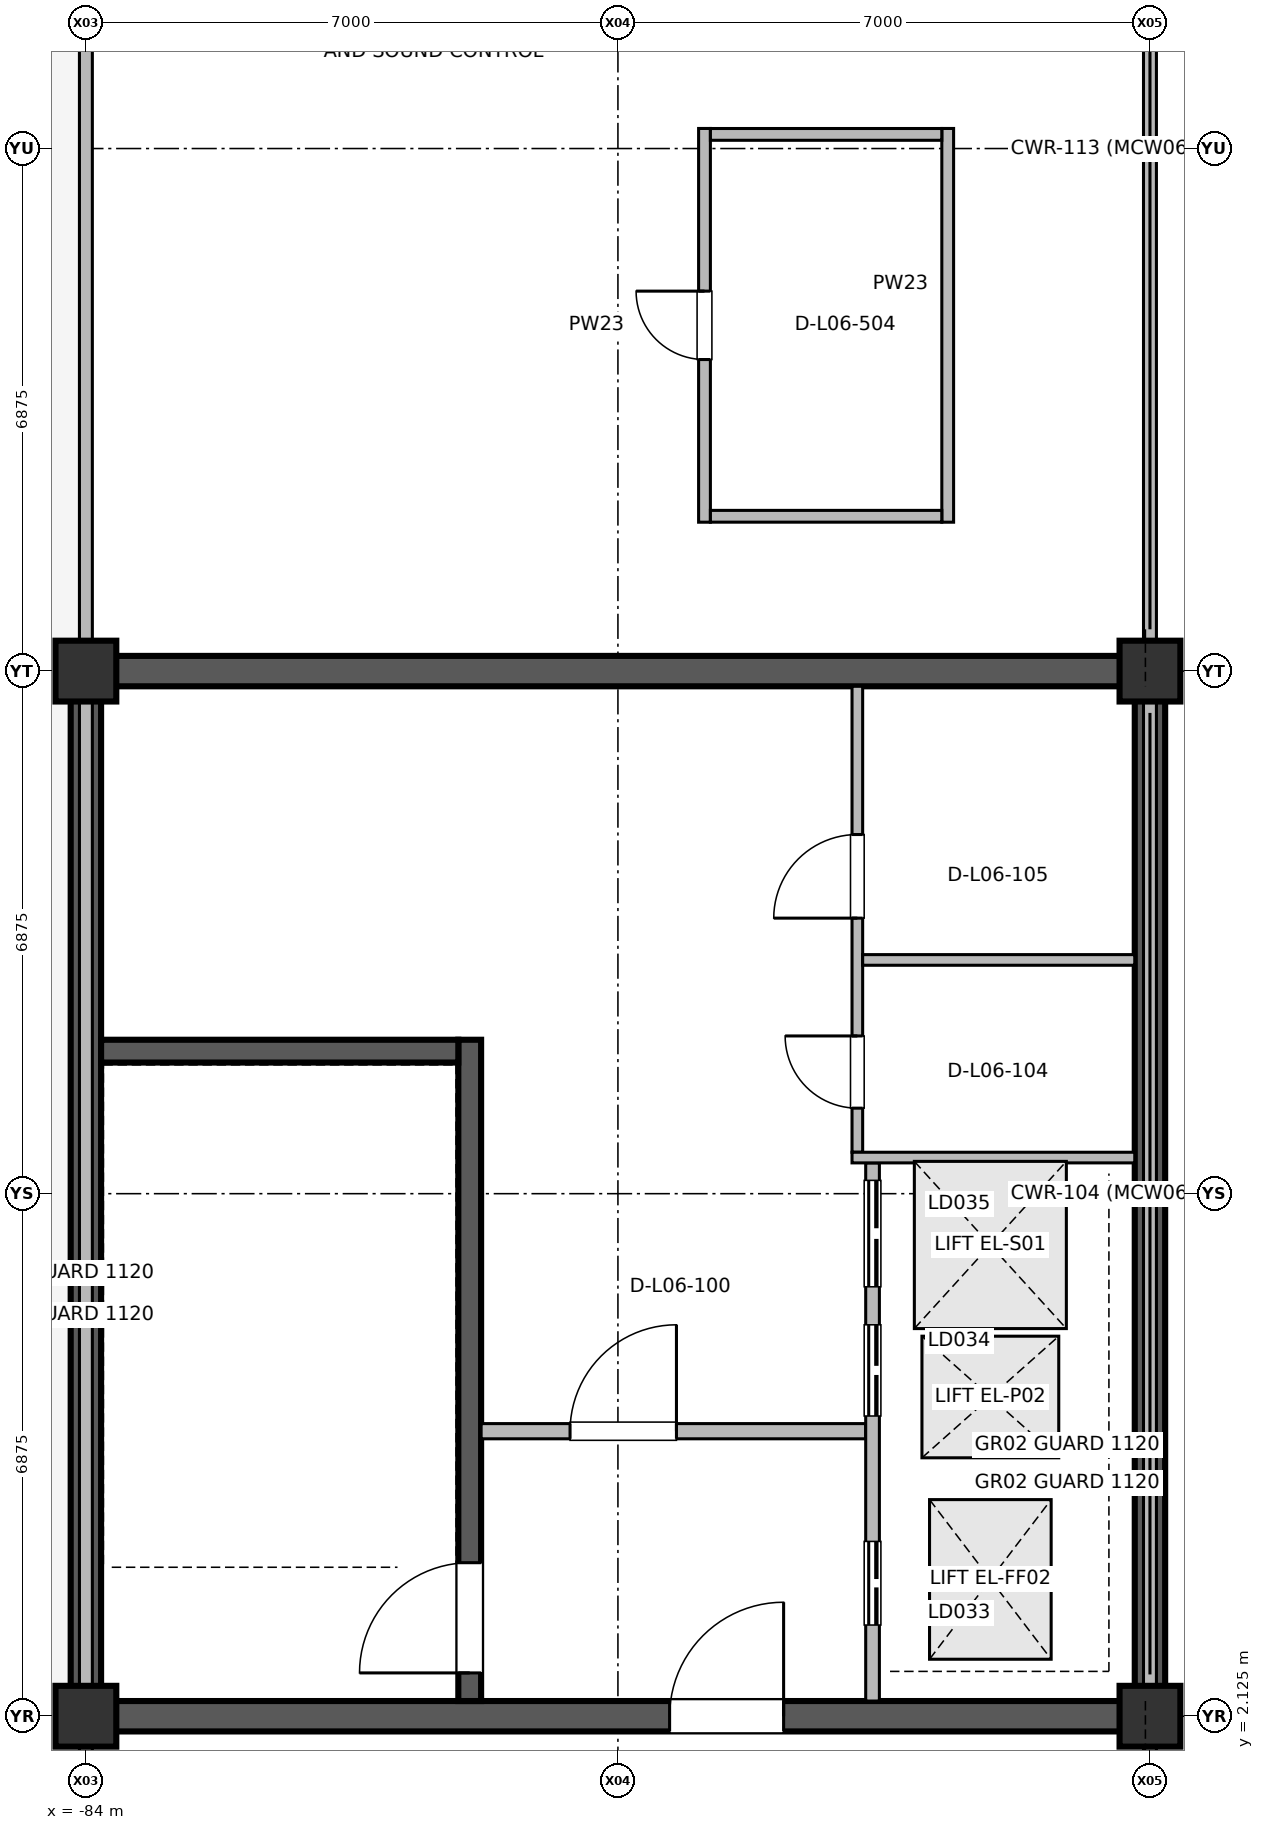
"""IFC4 building model, lengths in metres.
Left out: names, types, materials, properties, quantities, classifications, styles, units other than length and angle.
Written with IfcOpenShell. Run it as: python <this file> out.ifc"""

import sys

from ifc_helpers import new_model, si_unit, direction, frame, frame_2d, origin, origin_2d, place, context, subcontext, project, spatial, rectangle, extrude, element, fill, save


model = new_model("IFC4")
c1 = context("Model", 3, precision=1e-05, world=origin(), true_north=direction((0.0, 1.0)))
c2 = subcontext(c1, "Body", "Model", "MODEL_VIEW")
j1 = project(units=[si_unit("LENGTHUNIT", "METRE"), si_unit("PLANEANGLEUNIT", "RADIAN")], contexts=[c1])
p1 = place(None, origin())
s1 = spatial("IfcSite", under=j1, at=p1, CompositionType="ELEMENT")
p2 = place(p1, origin())
s2 = spatial("IfcBuilding", under=s1, at=p2, CompositionType="ELEMENT")
p3 = place(p2, frame((0.0, 0.0, 26.4)))
s3 = spatial("IfcBuildingStorey", under=s2, at=p3, CompositionType="ELEMENT", Elevation=26.4)
for number, where, z_axis, x_axis in (
    (1, (-84.0, 2.125, 0.0), (0.0, 0.0, 1.0), (1.0, 0.0, 0.0)),
    (2, (-84.0, 15.875, 0.0), (0.0, 0.0, 1.0), (1.0, 0.0, 0.0)),
    (3, (-70.0, 2.125, 0.0), (0.0, 0.0, 1.0), (1.0, 0.0, 0.0)),
    (4, (-70.0, 15.875, 0.0), (0.0, 0.0, 1.0), (1.0, 0.0, 0.0)),
):
    element("IfcColumn", number, at=place(p3, frame(where, z_axis=z_axis, x_axis=x_axis)), inside=s3, PredefinedType="COLUMN", context=c2, shape_type="SweptSolid", body=[
        extrude(rectangle(XDim=0.8, YDim=0.8, at=origin_2d()), origin(), (0.0, 0.0, 1.0), 4.965),
    ])
for number, where, z_axis, x_axis in (
    (5, (-84.0, 2.325, 0.0), (0.0, 0.0, 1.0), (0.0, 1.0, 0.0)),
    (6, (-70.0, 2.325, 0.0), (0.0, 0.0, 1.0), (0.0, 1.0, 0.0)),
):
    element("IfcWall", number, at=place(p3, frame(where, z_axis=z_axis, x_axis=x_axis)), inside=s3, PredefinedType="SHEAR", context=c2, shape_type="SweptSolid", body=[
        extrude(rectangle(XDim=13.35, YDim=0.4, at=frame_2d((6.675, 0.0))), origin(), (0.0, 0.0, 1.0), 4.965),
    ])
p4 = place(p3, frame((-83.8, 2.125, 0.0), z_axis=(0.0, 0.0, 1.0), x_axis=(1.0, 0.0, 0.0)))
e7 = element("IfcWall", 7, at=p4, inside=s3, PredefinedType="SHEAR", context=c2, shape_type="SweptSolid", body=[
    extrude(rectangle(XDim=13.6, YDim=0.4, at=frame_2d((6.8, 0.0))), origin(), (0.0, 0.0, 1.0), 4.965),
])
p5 = place(p4, frame((7.48, 0.0, 0.0)))
e8 = element("IfcOpeningElement", 8, at=p5, cuts=e7, PredefinedType="OPENING", context=c2, shape_type="SweptSolid", body=[
    extrude(rectangle(XDim=1.5, YDim=2.2, at=frame_2d((0.75, 1.1))), frame((0.0, 0.21, 0.0), z_axis=(0.0, -1.0, 0.0), x_axis=(1.0, 0.0, 0.0)), (0.0, 0.0, 1.0), 0.42),
])
p6 = place(p3, frame((-83.8, 15.875, 0.0), z_axis=(0.0, 0.0, 1.0), x_axis=(1.0, 0.0, 0.0)))
e9 = element("IfcWall", 9, at=p6, inside=s3, PredefinedType="SHEAR", context=c2, shape_type="SweptSolid", body=[
    extrude(rectangle(XDim=13.6, YDim=0.4, at=frame_2d((6.8, 0.0))), origin(), (0.0, 0.0, 1.0), 4.965),
])
for number, where, z_axis, x_axis in (
    (10, (-84.0, -45.8, 5.2), (0.0, 0.0, 1.0), (0.0, 1.0, 0.0)),
    (11, (-70.0, -45.8, 5.2), (0.0, 0.0, 1.0), (0.0, 1.0, 0.0)),
):
    element("IfcWall", number, at=place(p3, frame(where, z_axis=z_axis, x_axis=x_axis)), inside=s3, PredefinedType="PARAPET", context=c2, shape_type="SweptSolid", body=[
        extrude(rectangle(XDim=89.0, YDim=0.17, at=frame_2d((44.5, 0.0))), origin(), (0.0, 0.0, 1.0), 1.2),
    ])
p7 = place(p3, frame((-78.95, 2.325, 0.0), z_axis=(0.0, 0.0, 1.0), x_axis=(0.0, 1.0, 0.0)))
e12 = element("IfcWall", 12, at=p7, inside=s3, PredefinedType="SHEAR", context=c2, shape_type="SweptSolid", body=[
    extrude(rectangle(XDim=8.7, YDim=0.3, at=frame_2d((4.35, 0.0))), origin(), (0.0, 0.0, 1.0), 4.965),
])
p8 = place(p7, frame((0.37, 0.0, 0.0)))
e13 = element("IfcOpeningElement", 13, at=p8, cuts=e12, PredefinedType="OPENING", context=c2, shape_type="SweptSolid", body=[
    extrude(rectangle(XDim=1.45, YDim=2.2, at=frame_2d((0.725, 1.1))), frame((0.0, 0.16, 0.0), z_axis=(0.0, -1.0, 0.0), x_axis=(1.0, 0.0, 0.0)), (0.0, 0.0, 1.0), 0.32),
])
p9 = place(p3, frame((-78.8, 5.875, 0.0), z_axis=(0.0, 0.0, 1.0), x_axis=(1.0, 0.0, 0.0)))
e14 = element("IfcWall", 14, at=p9, inside=s3, PredefinedType="PARTITIONING", context=c2, shape_type="SweptSolid", body=[
    extrude(rectangle(XDim=5.06, YDim=0.2, at=frame_2d((2.53, 0.0))), origin(), (0.0, 0.0, 1.0), 4.22),
])
p10 = place(p9, frame((1.17, 0.0, 0.0)))
e15 = element("IfcOpeningElement", 15, at=p10, cuts=e14, PredefinedType="OPENING", context=c2, shape_type="SweptSolid", body=[
    extrude(rectangle(XDim=1.4, YDim=2.2, at=frame_2d((0.7, 1.1))), frame((0.0, 0.11, 0.0), z_axis=(0.0, -1.0, 0.0), x_axis=(1.0, 0.0, 0.0)), (0.0, 0.0, 1.0), 0.22),
])
p11 = place(p3, frame((-73.65, 2.325, 0.0), z_axis=(0.0, 0.0, 1.0), x_axis=(0.0, 1.0, 0.0)))
e16 = element("IfcWall", 16, at=p11, inside=s3, PredefinedType="PARTITIONING", context=c2, shape_type="SweptSolid", body=[
    extrude(rectangle(XDim=7.08, YDim=0.18, at=frame_2d((3.54, 0.0))), origin(), (0.0, 0.0, 1.0), 4.22),
])
p12 = place(p11, frame((1.0, 0.0, 0.0)))
e17 = element("IfcOpeningElement", 17, at=p12, cuts=e16, PredefinedType="OPENING", context=c2, shape_type="SweptSolid", body=[
    extrude(rectangle(XDim=1.1, YDim=2.2, at=frame_2d((0.55, 1.1))), frame((0.0, 0.1, 0.0), z_axis=(0.0, -1.0, 0.0), x_axis=(1.0, 0.0, 0.0)), (0.0, 0.0, 1.0), 0.2),
])
p13 = place(p11, frame((3.75, 0.0, 0.0)))
e18 = element("IfcOpeningElement", 18, at=p13, cuts=e16, PredefinedType="OPENING", context=c2, shape_type="SweptSolid", body=[
    extrude(rectangle(XDim=1.2, YDim=2.25, at=frame_2d((0.6, 1.125))), frame((0.0, 0.1, 0.0), z_axis=(0.0, -1.0, 0.0), x_axis=(1.0, 0.0, 0.0)), (0.0, 0.0, 1.0), 0.2),
])
p14 = place(p11, frame((5.45, 0.0, 0.0)))
e19 = element("IfcOpeningElement", 19, at=p14, cuts=e16, PredefinedType="OPENING", context=c2, shape_type="SweptSolid", body=[
    extrude(rectangle(XDim=1.4, YDim=2.3, at=frame_2d((0.7, 1.15))), frame((0.0, 0.1, 0.0), z_axis=(0.0, -1.0, 0.0), x_axis=(1.0, 0.0, 0.0)), (0.0, 0.0, 1.0), 0.2),
])
p15 = place(p3, frame((-73.85, 9.545, 0.0), z_axis=(0.0, 0.0, 1.0), x_axis=(0.0, 1.0, 0.0)))
e20 = element("IfcWall", 20, at=p15, inside=s3, PredefinedType="PARTITIONING", context=c2, shape_type="SweptSolid", body=[
    extrude(rectangle(XDim=6.13, YDim=0.14, at=frame_2d((3.065, 0.0))), origin(), (0.0, 0.0, 1.0), 4.22),
])
p16 = place(p15, frame((0.58, 0.0, 0.0)))
e21 = element("IfcOpeningElement", 21, at=p16, cuts=e20, PredefinedType="OPENING", context=c2, shape_type="SweptSolid", body=[
    extrude(rectangle(XDim=0.95, YDim=2.15, at=frame_2d((0.475, 1.075))), frame((0.0, 0.08, 0.0), z_axis=(0.0, -1.0, 0.0), x_axis=(1.0, 0.0, 0.0)), (0.0, 0.0, 1.0), 0.16),
])
p17 = place(p15, frame((3.08, 0.0, 0.0)))
e22 = element("IfcOpeningElement", 22, at=p17, cuts=e20, PredefinedType="OPENING", context=c2, shape_type="SweptSolid", body=[
    extrude(rectangle(XDim=1.1, YDim=2.15, at=frame_2d((0.55, 1.075))), frame((0.0, 0.08, 0.0), z_axis=(0.0, -1.0, 0.0), x_axis=(1.0, 0.0, 0.0)), (0.0, 0.0, 1.0), 0.16),
])
p18 = place(p3, frame((-75.861, 17.834, 0.0), z_axis=(0.0, 0.0, 1.0), x_axis=(0.0, 1.0, 0.0)))
e23 = element("IfcWall", 23, at=p18, inside=s3, PredefinedType="PARTITIONING", context=c2, shape_type="SweptSolid", body=[
    extrude(rectangle(XDim=5.18, YDim=0.155, at=frame_2d((2.59, 0.0))), origin(), (0.0, 0.0, 1.0), 4.22),
])
p19 = place(p18, frame((2.14, 0.0, 0.0)))
e24 = element("IfcOpeningElement", 24, at=p19, cuts=e23, PredefinedType="OPENING", context=c2, shape_type="SweptSolid", body=[
    extrude(rectangle(XDim=0.9, YDim=2.15, at=frame_2d((0.45, 1.075))), frame((0.0, 0.087, 0.0), z_axis=(0.0, -1.0, 0.0), x_axis=(1.0, 0.0, 0.0)), (0.0, 0.0, 1.0), 0.175),
])
p20 = place(p3, frame((-73.92, 9.475, 0.0), z_axis=(0.0, 0.0, 1.0), x_axis=(1.0, 0.0, 0.0)))
e25 = element("IfcWall", 25, at=p20, inside=s3, PredefinedType="PARTITIONING", context=c2, shape_type="SweptSolid", body=[
    extrude(rectangle(XDim=3.72, YDim=0.14, at=frame_2d((1.86, 0.0))), origin(), (0.0, 0.0, 1.0), 4.22),
])
p21 = place(p3, frame((-73.78, 12.075, 0.0), z_axis=(0.0, 0.0, 1.0), x_axis=(1.0, 0.0, 0.0)))
e26 = element("IfcWall", 26, at=p21, inside=s3, PredefinedType="PARTITIONING", context=c2, shape_type="SweptSolid", body=[
    extrude(rectangle(XDim=3.58, YDim=0.14, at=frame_2d((1.79, 0.0))), origin(), (0.0, 0.0, 1.0), 4.22),
])
p22 = place(p3, frame((-72.661, 17.834, 0.0), z_axis=(0.0, 0.0, 1.0), x_axis=(0.0, 1.0, 0.0)))
e27 = element("IfcWall", 27, at=p22, inside=s3, PredefinedType="PARTITIONING", context=c2, shape_type="SweptSolid", body=[
    extrude(rectangle(XDim=5.18, YDim=0.155, at=frame_2d((2.59, 0.0))), origin(), (0.0, 0.0, 1.0), 4.22),
])
for number, where, z_axis, x_axis in (
    (28, (-75.783, 17.912, 0.0), (0.0, 0.0, 1.0), (1.0, 0.0, 0.0)),
    (29, (-75.783, 22.936, 0.0), (0.0, 0.0, 1.0), (1.0, 0.0, 0.0)),
):
    element("IfcWall", number, at=place(p3, frame(where, z_axis=z_axis, x_axis=x_axis)), inside=s3, PredefinedType="PARTITIONING", context=c2, shape_type="SweptSolid", body=[
        extrude(rectangle(XDim=3.044, YDim=0.155, at=frame_2d((1.522, 0.0))), origin(), (0.0, 0.0, 1.0), 4.22),
    ])
p23 = place(p3, frame((-83.8, 10.875, 0.0), z_axis=(0.0, 0.0, 1.0), x_axis=(1.0, 0.0, 0.0)))
e30 = element("IfcWall", 30, at=p23, inside=s3, PredefinedType="SHEAR", context=c2, shape_type="SweptSolid", body=[
    extrude(rectangle(XDim=4.7, YDim=0.3, at=frame_2d((2.35, 0.0))), origin(), (0.0, 0.0, 1.0), 4.965),
])
p24 = place(p5, origin())
e31 = element("IfcDoor", 31, at=p24, inside=s3, OperationType="SINGLE_SWING_RIGHT", PredefinedType="DOOR", context=c2, shape_type="SweptSolid", body=[
    extrude(rectangle(XDim=1.5, YDim=2.2, at=frame_2d((0.75, 1.1))), frame((0.0, 0.025, 0.0), z_axis=(0.0, -1.0, 0.0), x_axis=(1.0, 0.0, 0.0)), (0.0, 0.0, 1.0), 0.05),
])
fill(e8, e31)
p25 = place(p8, origin())
e32 = element("IfcDoor", 32, at=p25, inside=s3, OperationType="SINGLE_SWING_LEFT", PredefinedType="DOOR", context=c2, shape_type="SweptSolid", body=[
    extrude(rectangle(XDim=1.45, YDim=2.2, at=frame_2d((0.725, 1.1))), frame((0.0, 0.025, 0.0), z_axis=(0.0, -1.0, 0.0), x_axis=(1.0, 0.0, 0.0)), (0.0, 0.0, 1.0), 0.05),
])
fill(e13, e32)
p26 = place(p10, origin())
e33 = element("IfcDoor", 33, at=p26, inside=s3, OperationType="SINGLE_SWING_RIGHT", PredefinedType="DOOR", context=c2, shape_type="SweptSolid", body=[
    extrude(rectangle(XDim=1.4, YDim=2.2, at=frame_2d((0.7, 1.1))), frame((0.0, 0.025, 0.0), z_axis=(0.0, -1.0, 0.0), x_axis=(1.0, 0.0, 0.0)), (0.0, 0.0, 1.0), 0.05),
])
fill(e15, e33)
p27 = place(p12, origin())
e34 = element("IfcDoor", 34, at=p27, inside=s3, OperationType="DOUBLE_DOOR_SLIDING", PredefinedType="DOOR", context=c2, shape_type="SweptSolid", body=[
    extrude(rectangle(XDim=1.1, YDim=2.2, at=frame_2d((0.55, 1.1))), frame((0.0, 0.025, 0.0), z_axis=(0.0, -1.0, 0.0), x_axis=(1.0, 0.0, 0.0)), (0.0, 0.0, 1.0), 0.05),
])
fill(e17, e34)
p28 = place(p13, origin())
e35 = element("IfcDoor", 35, at=p28, inside=s3, OperationType="DOUBLE_DOOR_SLIDING", PredefinedType="DOOR", context=c2, shape_type="SweptSolid", body=[
    extrude(rectangle(XDim=1.2, YDim=2.25, at=frame_2d((0.6, 1.125))), frame((0.0, 0.025, 0.0), z_axis=(0.0, -1.0, 0.0), x_axis=(1.0, 0.0, 0.0)), (0.0, 0.0, 1.0), 0.05),
])
fill(e18, e35)
p29 = place(p14, origin())
e36 = element("IfcDoor", 36, at=p29, inside=s3, OperationType="DOUBLE_DOOR_SLIDING", PredefinedType="DOOR", context=c2, shape_type="SweptSolid", body=[
    extrude(rectangle(XDim=1.4, YDim=2.3, at=frame_2d((0.7, 1.15))), frame((0.0, 0.025, 0.0), z_axis=(0.0, -1.0, 0.0), x_axis=(1.0, 0.0, 0.0)), (0.0, 0.0, 1.0), 0.05),
])
fill(e19, e36)
p30 = place(p16, origin())
e37 = element("IfcDoor", 37, at=p30, inside=s3, OperationType="SINGLE_SWING_RIGHT", PredefinedType="DOOR", context=c2, shape_type="SweptSolid", body=[
    extrude(rectangle(XDim=0.95, YDim=2.15, at=frame_2d((0.475, 1.075))), frame((0.0, 0.025, 0.0), z_axis=(0.0, -1.0, 0.0), x_axis=(1.0, 0.0, 0.0)), (0.0, 0.0, 1.0), 0.05),
])
fill(e21, e37)
p31 = place(p17, origin())
e38 = element("IfcDoor", 38, at=p31, inside=s3, OperationType="SINGLE_SWING_LEFT", PredefinedType="DOOR", context=c2, shape_type="SweptSolid", body=[
    extrude(rectangle(XDim=1.1, YDim=2.15, at=frame_2d((0.55, 1.075))), frame((0.0, 0.025, 0.0), z_axis=(0.0, -1.0, 0.0), x_axis=(1.0, 0.0, 0.0)), (0.0, 0.0, 1.0), 0.05),
])
fill(e22, e38)
p32 = place(p19, origin())
e39 = element("IfcDoor", 39, at=p32, inside=s3, OperationType="SINGLE_SWING_RIGHT", PredefinedType="DOOR", context=c2, shape_type="SweptSolid", body=[
    extrude(rectangle(XDim=0.9, YDim=2.15, at=frame_2d((0.45, 1.075))), frame((0.0, 0.025, 0.0), z_axis=(0.0, -1.0, 0.0), x_axis=(1.0, 0.0, 0.0)), (0.0, 0.0, 1.0), 0.05),
])
fill(e24, e39)
save(model, sys.argv[1])
